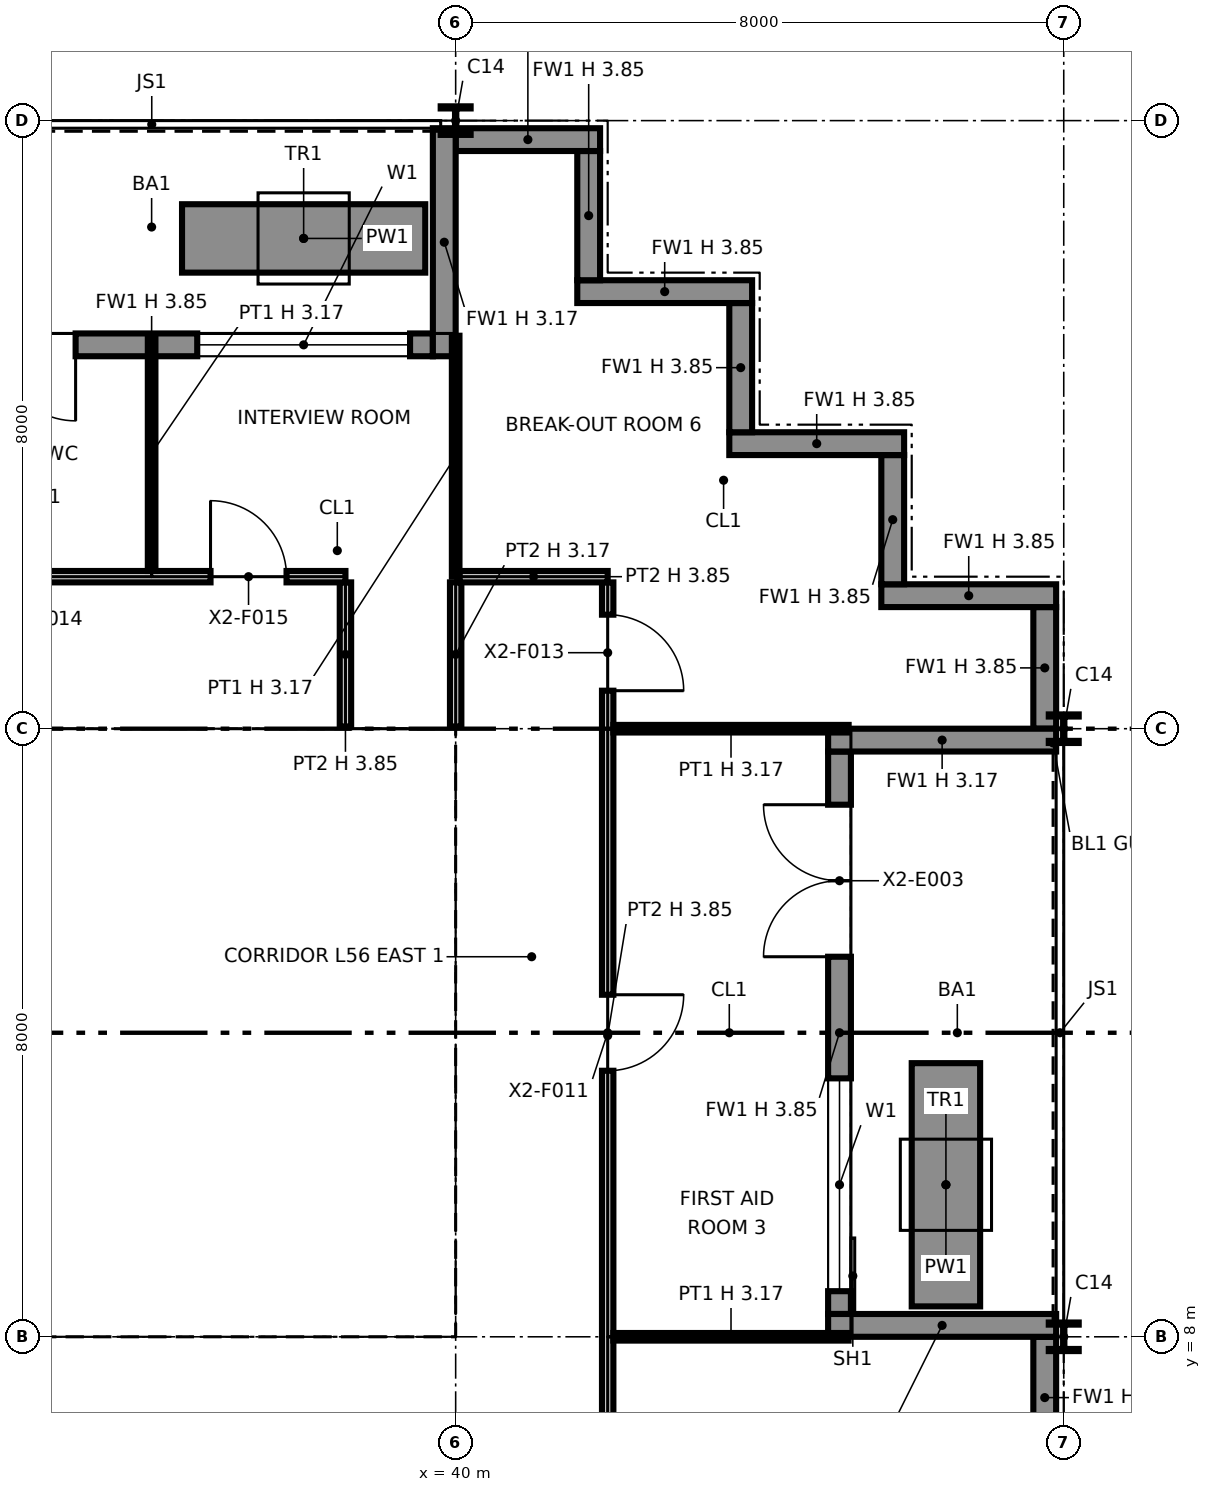
"""IFC4 building model, lengths in metres.
Left out: names, types, materials, properties, quantities, classifications, styles, units other than length and angle.
Written with IfcOpenShell. Run it as: python <this file> out.ifc"""

import sys

from ifc_helpers import new_model, si_unit, direction, frame, frame_2d, origin, origin_2d, place, context, subcontext, project, spatial, polyline, rectangle, i_section, outline, extrude, element, fill, save


model = new_model("IFC4")
c1 = context("Model", 3, precision=1e-05, world=origin(), true_north=direction((0.0, 1.0)))
c2 = subcontext(c1, "Body", "Model", "MODEL_VIEW")
j1 = project(units=[si_unit("LENGTHUNIT", "METRE"), si_unit("PLANEANGLEUNIT", "RADIAN")], contexts=[c1])
p1 = place(None, origin())
s1 = spatial("IfcSite", under=j1, at=p1, CompositionType="ELEMENT")
p2 = place(p1, origin())
s2 = spatial("IfcBuilding", under=s1, at=p2, CompositionType="ELEMENT")
p3 = place(p2, frame((0.0, 0.0, 259.0)))
s3 = spatial("IfcBuildingStorey", under=s2, at=p3, CompositionType="ELEMENT", Elevation=259.0)
for number, where, z_axis, x_axis in (
    (1, (40.0, 8.0, 0.0), (0.0, 0.0, 1.0), (1.0, 0.0, 0.0)),
    (2, (40.0, 16.0, 0.0), (0.0, 0.0, 1.0), (1.0, 0.0, 0.0)),
):
    element("IfcColumn", number, at=place(p3, frame(where, z_axis=z_axis, x_axis=x_axis)), inside=s3, PredefinedType="COLUMN", context=c2, shape_type="SweptSolid", body=[
        extrude(i_section(OverallWidth=0.371, OverallDepth=0.361, WebThickness=0.012, FlangeThickness=0.02, at=origin_2d()), origin(), (0.0, 0.0, 1.0), 3.85),
    ])
for number, where, z_axis, x_axis in (
    (3, (40.0, 24.0, 0.0), (0.0, 0.0, 1.0), (1.0, 0.0, 0.0)),
    (4, (48.0, 8.0, 0.0), (0.0, 0.0, 1.0), (1.0, 0.0, 0.0)),
    (5, (48.0, 16.0, 0.0), (0.0, 0.0, 1.0), (1.0, 0.0, 0.0)),
):
    element("IfcColumn", number, at=place(p3, frame(where, z_axis=z_axis, x_axis=x_axis)), inside=s3, PredefinedType="COLUMN", context=c2, shape_type="SweptSolid", body=[
        extrude(i_section(OverallWidth=0.394, OverallDepth=0.376, WebThickness=0.017, FlangeThickness=0.028, at=origin_2d()), origin(), (0.0, 0.0, 1.0), 3.85),
    ])
p4 = place(p3, frame((47.75, 6.4, 0.0), z_axis=(0.0, 0.0, 1.0), x_axis=(0.0, 1.0, 0.0)))
e6 = element("IfcWall", 6, at=p4, inside=s3, PredefinedType="SOLIDWALL", context=c2, shape_type="SweptSolid", body=[
    extrude(rectangle(XDim=1.6, YDim=0.3, at=frame_2d((0.8, 0.0))), origin(), (0.0, 0.0, 1.0), 3.85),
])
p5 = place(p3, frame((45.05, 8.3, 0.0), z_axis=(0.0, 0.0, 1.0), x_axis=(0.0, 1.0, 0.0)))
e7 = element("IfcWall", 7, at=p5, inside=s3, PredefinedType="SOLIDWALL", context=c2, shape_type="SweptSolid", body=[
    extrude(rectangle(XDim=7.4, YDim=0.3, at=frame_2d((3.7, 0.0))), origin(), (0.0, 0.0, 1.0), 3.85),
])
p6 = place(p5, frame((0.3, 0.0, 0.9)))
e8 = element("IfcOpeningElement", 8, at=p6, cuts=e7, PredefinedType="OPENING", context=c2, shape_type="SweptSolid", body=[
    extrude(rectangle(XDim=2.8, YDim=2.2, at=frame_2d((1.4, 1.1))), frame((0.0, 0.16, 0.0), z_axis=(0.0, -1.0, 0.0), x_axis=(1.0, 0.0, 0.0)), (0.0, 0.0, 1.0), 0.32),
])
p7 = place(p5, frame((4.7, 0.0, 0.0)))
e9 = element("IfcOpeningElement", 9, at=p7, cuts=e7, PredefinedType="OPENING", context=c2, shape_type="SweptSolid", body=[
    extrude(rectangle(XDim=2.0, YDim=2.4, at=frame_2d((1.0, 1.2))), frame((0.0, 0.16, 0.0), z_axis=(0.0, -1.0, 0.0), x_axis=(1.0, 0.0, 0.0)), (0.0, 0.0, 1.0), 0.32),
])
for number, where, z_axis, x_axis in (
    (10, (47.9, 8.15, 0.0), (0.0, 0.0, 1.0), (-1.0, 0.0, 0.0)),
    (11, (47.9, 15.85, 0.0), (0.0, 0.0, 1.0), (-1.0, 0.0, 0.0)),
):
    element("IfcWall", number, at=place(p3, frame(where, z_axis=z_axis, x_axis=x_axis)), inside=s3, PredefinedType="SOLIDWALL", context=c2, shape_type="SweptSolid", body=[
        extrude(rectangle(XDim=3.0, YDim=0.3, at=frame_2d((1.5, 0.0))), origin(), (0.0, 0.0, 1.0), 3.171),
    ])
p8 = place(p3, frame((47.75, 16.0, 0.0), z_axis=(0.0, 0.0, 1.0), x_axis=(0.0, 1.0, 0.0)))
e12 = element("IfcWall", 12, at=p8, inside=s3, PredefinedType="SOLIDWALL", context=c2, shape_type="SweptSolid", body=[
    extrude(rectangle(XDim=1.6, YDim=0.3, at=frame_2d((0.8, 0.0))), origin(), (0.0, 0.0, 1.0), 3.85),
])
p9 = place(p3, frame((46.45, 8.4, 0.0), z_axis=(0.0, 0.0, 1.0), x_axis=(0.0, 1.0, 0.0)))
e13 = element("IfcWall", 13, at=p9, inside=s3, PredefinedType="SOLIDWALL", context=c2, shape_type="SweptSolid", body=[
    extrude(rectangle(XDim=3.2, YDim=0.9, at=frame_2d((1.6, 0.0))), origin(), (0.0, 0.0, 1.0), 0.6),
])
p10 = place(p3, frame((47.9, 17.75, 0.0), z_axis=(0.0, 0.0, 1.0), x_axis=(-1.0, 0.0, 0.0)))
e14 = element("IfcWall", 14, at=p10, inside=s3, PredefinedType="SOLIDWALL", context=c2, shape_type="SweptSolid", body=[
    extrude(rectangle(XDim=2.3, YDim=0.3, at=frame_2d((1.15, 0.0))), origin(), (0.0, 0.0, 1.0), 3.85),
])
p11 = place(p3, frame((45.75, 17.9, 0.0), z_axis=(0.0, 0.0, 1.0), x_axis=(0.0, 1.0, 0.0)))
e15 = element("IfcWall", 15, at=p11, inside=s3, PredefinedType="SOLIDWALL", context=c2, shape_type="SweptSolid", body=[
    extrude(rectangle(XDim=1.7, YDim=0.3, at=frame_2d((0.85, 0.0))), origin(), (0.0, 0.0, 1.0), 3.85),
])
p12 = place(p3, frame((45.9, 19.75, 0.0), z_axis=(0.0, 0.0, 1.0), x_axis=(-1.0, 0.0, 0.0)))
e16 = element("IfcWall", 16, at=p12, inside=s3, PredefinedType="SOLIDWALL", context=c2, shape_type="SweptSolid", body=[
    extrude(rectangle(XDim=2.3, YDim=0.3, at=frame_2d((1.15, 0.0))), origin(), (0.0, 0.0, 1.0), 3.85),
])
p13 = place(p3, frame((43.75, 19.9, 0.0), z_axis=(0.0, 0.0, 1.0), x_axis=(0.0, 1.0, 0.0)))
e17 = element("IfcWall", 17, at=p13, inside=s3, PredefinedType="SOLIDWALL", context=c2, shape_type="SweptSolid", body=[
    extrude(rectangle(XDim=1.7, YDim=0.3, at=frame_2d((0.85, 0.0))), origin(), (0.0, 0.0, 1.0), 3.85),
])
p14 = place(p3, frame((43.9, 21.75, 0.0), z_axis=(0.0, 0.0, 1.0), x_axis=(-1.0, 0.0, 0.0)))
e18 = element("IfcWall", 18, at=p14, inside=s3, PredefinedType="SOLIDWALL", context=c2, shape_type="SweptSolid", body=[
    extrude(rectangle(XDim=2.3, YDim=0.3, at=frame_2d((1.15, 0.0))), origin(), (0.0, 0.0, 1.0), 3.85),
])
p15 = place(p3, frame((41.75, 21.9, 0.0), z_axis=(0.0, 0.0, 1.0), x_axis=(0.0, 1.0, 0.0)))
e19 = element("IfcWall", 19, at=p15, inside=s3, PredefinedType="SOLIDWALL", context=c2, shape_type="SweptSolid", body=[
    extrude(rectangle(XDim=1.7, YDim=0.3, at=frame_2d((0.85, 0.0))), origin(), (0.0, 0.0, 1.0), 3.85),
])
p16 = place(p3, frame((41.9, 23.75, 0.0), z_axis=(0.0, 0.0, 1.0), x_axis=(-1.0, 0.0, 0.0)))
e20 = element("IfcWall", 20, at=p16, inside=s3, PredefinedType="SOLIDWALL", context=c2, shape_type="SweptSolid", body=[
    extrude(rectangle(XDim=1.9, YDim=0.3, at=frame_2d((0.95, 0.0))), origin(), (0.0, 0.0, 1.0), 3.85),
])
p17 = place(p3, frame((39.7, 21.05, 0.0), z_axis=(0.0, 0.0, 1.0), x_axis=(-1.0, 0.0, 0.0)))
e21 = element("IfcWall", 21, at=p17, inside=s3, PredefinedType="SOLIDWALL", context=c2, shape_type="SweptSolid", body=[
    extrude(rectangle(XDim=7.4, YDim=0.3, at=frame_2d((3.7, 0.0))), origin(), (0.0, 0.0, 1.0), 3.85),
])
p18 = place(p17, frame((0.3, 0.0, 0.9)))
e22 = element("IfcOpeningElement", 22, at=p18, cuts=e21, PredefinedType="OPENING", context=c2, shape_type="SweptSolid", body=[
    extrude(rectangle(XDim=2.8, YDim=2.2, at=frame_2d((1.4, 1.1))), frame((0.0, 0.16, 0.0), z_axis=(0.0, -1.0, 0.0), x_axis=(1.0, 0.0, 0.0)), (0.0, 0.0, 1.0), 0.32),
])
p19 = place(p17, frame((4.7, 0.0, 0.0)))
e23 = element("IfcOpeningElement", 23, at=p19, cuts=e21, PredefinedType="OPENING", context=c2, shape_type="SweptSolid", body=[
    extrude(rectangle(XDim=2.0, YDim=2.4, at=frame_2d((1.0, 1.2))), frame((0.0, 0.16, 0.0), z_axis=(0.0, -1.0, 0.0), x_axis=(1.0, 0.0, 0.0)), (0.0, 0.0, 1.0), 0.32),
])
p20 = place(p3, frame((39.85, 23.9, 0.0), z_axis=(0.0, 0.0, 1.0), x_axis=(0.0, -1.0, 0.0)))
e24 = element("IfcWall", 24, at=p20, inside=s3, PredefinedType="SOLIDWALL", context=c2, shape_type="SweptSolid", body=[
    extrude(rectangle(XDim=3.0, YDim=0.3, at=frame_2d((1.5, 0.0))), origin(), (0.0, 0.0, 1.0), 3.171),
])
p21 = place(p3, frame((39.6, 22.45, 0.0), z_axis=(0.0, 0.0, 1.0), x_axis=(-1.0, 0.0, 0.0)))
e25 = element("IfcWall", 25, at=p21, inside=s3, PredefinedType="SOLIDWALL", context=c2, shape_type="SweptSolid", body=[
    extrude(rectangle(XDim=3.2, YDim=0.9, at=frame_2d((1.6, 0.0))), origin(), (0.0, 0.0, 1.0), 0.6),
])
p22 = place(p3, frame((24.65, 8.75, 0.0), z_axis=(0.0, 0.0, 1.0), x_axis=(1.0, 0.0, 0.0)))
e26 = element("IfcWall", 26, at=p22, inside=s3, PredefinedType="PARTITIONING", context=c2, shape_type="SweptSolid", body=[
    extrude(outline(polyline([(0.0, 0.0), (14.7, 0.0), (14.7, 3.85), (7.438, 3.85), (7.438, 3.308), (7.262, 3.308), (7.261, 3.85), (0.0, 3.85), (0.0, 0.0)])), frame((0.0, 0.1, 0.0), z_axis=(0.0, -1.0, 0.0), x_axis=(1.0, 0.0, 0.0)), (0.0, 0.0, 1.0), 0.2),
])
p23 = place(p3, frame((24.65, 15.25, 0.0), z_axis=(0.0, 0.0, 1.0), x_axis=(1.0, 0.0, 0.0)))
e27 = element("IfcWall", 27, at=p23, inside=s3, PredefinedType="PARTITIONING", context=c2, shape_type="SweptSolid", body=[
    extrude(outline(polyline([(0.0, 0.0), (14.7, 0.0), (14.7, 3.85), (7.438, 3.85), (7.438, 3.308), (7.262, 3.308), (7.261, 3.85), (0.0, 3.85), (0.0, 0.0)])), frame((0.0, 0.1, 0.0), z_axis=(0.0, -1.0, 0.0), x_axis=(1.0, 0.0, 0.0)), (0.0, 0.0, 1.0), 0.2),
])
p24 = place(p23, frame((2.85, 0.0, 0.0)))
e28 = element("IfcOpeningElement", 28, at=p24, cuts=e27, PredefinedType="OPENING", context=c2, shape_type="SweptSolid", body=[
    extrude(rectangle(XDim=1.8, YDim=2.1, at=frame_2d((0.9, 1.05))), frame((0.0, 0.11, 0.0), z_axis=(0.0, -1.0, 0.0), x_axis=(1.0, 0.0, 0.0)), (0.0, 0.0, 1.0), 0.22),
])
p25 = place(p23, frame((9.95, 0.0, 0.0), z_axis=(0.0, 0.0, 1.0), x_axis=(-1.0, 0.0, 0.0)))
e29 = element("IfcOpeningElement", 29, at=p25, cuts=e27, PredefinedType="OPENING", context=c2, shape_type="SweptSolid", body=[
    extrude(rectangle(XDim=1.4, YDim=2.1, at=frame_2d((0.7, 1.05))), frame((0.0, 0.11, 0.0), z_axis=(0.0, -1.0, 0.0), x_axis=(1.0, 0.0, 0.0)), (0.0, 0.0, 1.0), 0.22),
])
p26 = place(p23, frame((13.4, 0.0, 0.0), z_axis=(0.0, 0.0, 1.0), x_axis=(-1.0, 0.0, 0.0)))
e30 = element("IfcOpeningElement", 30, at=p26, cuts=e27, PredefinedType="OPENING", context=c2, shape_type="SweptSolid", body=[
    extrude(rectangle(XDim=1.4, YDim=2.1, at=frame_2d((0.7, 1.05))), frame((0.0, 0.11, 0.0), z_axis=(0.0, -1.0, 0.0), x_axis=(1.0, 0.0, 0.0)), (0.0, 0.0, 1.0), 0.22),
])
for number, where, z_axis, x_axis in (
    (31, (35.6, 8.85, 0.0), (0.0, 0.0, 1.0), (0.0, 1.0, 0.0)),
    (32, (39.25, 8.85, 0.0), (0.0, 0.0, 1.0), (0.0, 1.0, 0.0)),
):
    element("IfcWall", number, at=place(p3, frame(where, z_axis=z_axis, x_axis=x_axis)), inside=s3, PredefinedType="PARTITIONING", context=c2, shape_type="SweptSolid", body=[
        extrude(rectangle(XDim=6.3, YDim=0.2, at=frame_2d((3.15, 0.0))), origin(), (0.0, 0.0, 1.0), 3.85),
    ])
p27 = place(p3, frame((42.0, 6.0, 0.0), z_axis=(0.0, 0.0, 1.0), x_axis=(0.0, 1.0, 0.0)))
e33 = element("IfcWall", 33, at=p27, inside=s3, PredefinedType="PARTITIONING", context=c2, shape_type="SweptSolid", body=[
    extrude(outline(polyline([(0.0, 0.0), (11.925, 0.0), (11.925, 3.85), (10.3, 3.85), (10.298, 3.172), (9.702, 3.172), (9.7, 3.85), (6.3, 3.85), (6.298, 3.172), (5.702, 3.172), (5.7, 3.85), (2.3, 3.85), (2.298, 3.172), (1.702, 3.172), (1.7, 3.85), (0.0, 3.85), (0.0, 0.0)])), frame((0.0, 0.075, 0.0), z_axis=(0.0, -1.0, 0.0), x_axis=(1.0, 0.0, 0.0)), (0.0, 0.0, 1.0), 0.15),
])
p28 = place(p27, frame((6.5, 0.0, 0.0), z_axis=(0.0, 0.0, 1.0), x_axis=(-1.0, 0.0, 0.0)))
e34 = element("IfcOpeningElement", 34, at=p28, cuts=e33, PredefinedType="OPENING", context=c2, shape_type="SweptSolid", body=[
    extrude(rectangle(XDim=1.0, YDim=2.1, at=frame_2d((0.5, 1.05))), frame((0.0, 0.085, 0.0), z_axis=(0.0, -1.0, 0.0), x_axis=(1.0, 0.0, 0.0)), (0.0, 0.0, 1.0), 0.17),
])
p29 = place(p27, frame((11.5, 0.0, 0.0), z_axis=(0.0, 0.0, 1.0), x_axis=(-1.0, 0.0, 0.0)))
e35 = element("IfcOpeningElement", 35, at=p29, cuts=e33, PredefinedType="OPENING", context=c2, shape_type="SweptSolid", body=[
    extrude(rectangle(XDim=1.0, YDim=2.1, at=frame_2d((0.5, 1.05))), frame((0.0, 0.085, 0.0), z_axis=(0.0, -1.0, 0.0), x_axis=(1.0, 0.0, 0.0)), (0.0, 0.0, 1.0), 0.17),
])
for number, where, z_axis, x_axis in (
    (36, (42.075, 8.0, 0.0), (0.0, 0.0, 1.0), (1.0, 0.0, 0.0)),
    (37, (42.075, 16.0, 0.0), (0.0, 0.0, 1.0), (1.0, 0.0, 0.0)),
):
    element("IfcWall", number, at=place(p3, frame(where, z_axis=z_axis, x_axis=x_axis)), inside=s3, PredefinedType="PARTITIONING", context=c2, shape_type="SweptSolid", body=[
        extrude(rectangle(XDim=3.095, YDim=0.1, at=frame_2d((1.547, 0.0))), origin(), (0.0, 0.0, 1.0), 3.172),
    ])
p30 = place(p3, frame((38.55, 16.03, 0.0), z_axis=(0.0, 0.0, 1.0), x_axis=(0.0, 1.0, 0.0)))
e38 = element("IfcWall", 38, at=p30, inside=s3, PredefinedType="PARTITIONING", context=c2, shape_type="SweptSolid", body=[
    extrude(rectangle(XDim=1.895, YDim=0.15, at=frame_2d((0.948, 0.0))), origin(), (0.0, 0.0, 1.0), 3.85),
])
p31 = place(p3, frame((40.0, 16.03, 0.0), z_axis=(0.0, 0.0, 1.0), x_axis=(0.0, 1.0, 0.0)))
e39 = element("IfcWall", 39, at=p31, inside=s3, PredefinedType="PARTITIONING", context=c2, shape_type="SweptSolid", body=[
    extrude(rectangle(XDim=1.895, YDim=0.15, at=frame_2d((0.948, 0.0))), origin(), (0.0, 0.0, 1.0), 3.172),
])
p32 = place(p3, frame((26.075, 18.0, 0.0), z_axis=(0.0, 0.0, 1.0), x_axis=(1.0, 0.0, 0.0)))
e40 = element("IfcWall", 40, at=p32, inside=s3, PredefinedType="PARTITIONING", context=c2, shape_type="SweptSolid", body=[
    extrude(rectangle(XDim=12.475, YDim=0.15, at=frame_2d((6.238, 0.0))), origin(), (0.0, 0.0, 1.0), 3.85),
])
p33 = place(p32, frame((7.425, 0.0, 0.0)))
e41 = element("IfcOpeningElement", 41, at=p33, cuts=e40, PredefinedType="OPENING", context=c2, shape_type="SweptSolid", body=[
    extrude(rectangle(XDim=1.0, YDim=2.1, at=frame_2d((0.5, 1.05))), frame((0.0, 0.085, 0.0), z_axis=(0.0, -1.0, 0.0), x_axis=(1.0, 0.0, 0.0)), (0.0, 0.0, 1.0), 0.17),
])
p34 = place(p32, frame((10.7, 0.0, 0.0)))
e42 = element("IfcOpeningElement", 42, at=p34, cuts=e40, PredefinedType="OPENING", context=c2, shape_type="SweptSolid", body=[
    extrude(rectangle(XDim=1.0, YDim=2.1, at=frame_2d((0.5, 1.05))), frame((0.0, 0.085, 0.0), z_axis=(0.0, -1.0, 0.0), x_axis=(1.0, 0.0, 0.0)), (0.0, 0.0, 1.0), 0.17),
])
p35 = place(p32, frame((3.925, 0.0, 0.0), z_axis=(0.0, 0.0, 1.0), x_axis=(-1.0, 0.0, 0.0)))
e43 = element("IfcOpeningElement", 43, at=p35, cuts=e40, PredefinedType="OPENING", context=c2, shape_type="SweptSolid", body=[
    extrude(rectangle(XDim=1.0, YDim=2.1, at=frame_2d((0.5, 1.05))), frame((0.0, 0.085, 0.0), z_axis=(0.0, -1.0, 0.0), x_axis=(1.0, 0.0, 0.0)), (0.0, 0.0, 1.0), 0.17),
])
p36 = place(p3, frame((36.0, 18.075, 0.0), z_axis=(0.0, 0.0, 1.0), x_axis=(0.0, 1.0, 0.0)))
e44 = element("IfcWall", 44, at=p36, inside=s3, PredefinedType="PARTITIONING", context=c2, shape_type="SweptSolid", body=[
    extrude(rectangle(XDim=3.095, YDim=0.1, at=frame_2d((1.547, 0.0))), origin(), (0.0, 0.0, 1.0), 3.172),
])
p37 = place(p3, frame((40.05, 18.0, 0.0), z_axis=(0.0, 0.0, 1.0), x_axis=(1.0, 0.0, 0.0)))
e45 = element("IfcWall", 45, at=p37, inside=s3, PredefinedType="PARTITIONING", context=c2, shape_type="SweptSolid", body=[
    extrude(rectangle(XDim=1.95, YDim=0.15, at=frame_2d((0.975, 0.0))), origin(), (0.0, 0.0, 1.0), 3.85),
])
p38 = place(p3, frame((40.0, 18.0, 0.0), z_axis=(0.0, 0.0, 1.0), x_axis=(0.0, 1.0, 0.0)))
e46 = element("IfcWall", 46, at=p38, inside=s3, PredefinedType="PARTITIONING", context=c2, shape_type="SweptSolid", body=[
    extrude(rectangle(XDim=3.17, YDim=0.1, at=frame_2d((1.585, 0.0))), origin(), (0.0, 0.0, 1.0), 3.172),
])
p39 = place(p6, origin())
e47 = element("IfcWindow", 47, at=p39, inside=s3, PartitioningType="SINGLE_PANEL", PredefinedType="WINDOW", context=c2, shape_type="SweptSolid", body=[
    extrude(rectangle(XDim=2.8, YDim=2.2, at=frame_2d((1.4, 1.1))), frame((0.0, 0.03, 0.0), z_axis=(0.0, -1.0, 0.0), x_axis=(1.0, 0.0, 0.0)), (0.0, 0.0, 1.0), 0.06),
])
fill(e8, e47)
p40 = place(p7, origin())
e48 = element("IfcDoor", 48, at=p40, inside=s3, OperationType="DOUBLE_DOOR_SINGLE_SWING", PredefinedType="DOOR", context=c2, shape_type="SweptSolid", body=[
    extrude(rectangle(XDim=2.0, YDim=2.4, at=frame_2d((1.0, 1.2))), frame((0.0, 0.025, 0.0), z_axis=(0.0, -1.0, 0.0), x_axis=(1.0, 0.0, 0.0)), (0.0, 0.0, 1.0), 0.05),
])
fill(e9, e48)
p41 = place(p18, origin())
e49 = element("IfcWindow", 49, at=p41, inside=s3, PartitioningType="SINGLE_PANEL", PredefinedType="WINDOW", context=c2, shape_type="SweptSolid", body=[
    extrude(rectangle(XDim=2.8, YDim=2.2, at=frame_2d((1.4, 1.1))), frame((0.0, 0.03, 0.0), z_axis=(0.0, -1.0, 0.0), x_axis=(1.0, 0.0, 0.0)), (0.0, 0.0, 1.0), 0.06),
])
fill(e22, e49)
p42 = place(p19, origin())
e50 = element("IfcDoor", 50, at=p42, inside=s3, OperationType="DOUBLE_DOOR_SINGLE_SWING", PredefinedType="DOOR", context=c2, shape_type="SweptSolid", body=[
    extrude(rectangle(XDim=2.0, YDim=2.4, at=frame_2d((1.0, 1.2))), frame((0.0, 0.025, 0.0), z_axis=(0.0, -1.0, 0.0), x_axis=(1.0, 0.0, 0.0)), (0.0, 0.0, 1.0), 0.05),
])
fill(e23, e50)
p43 = place(p26, origin())
e51 = element("IfcDoor", 51, at=p43, inside=s3, OperationType="DOUBLE_DOOR_SINGLE_SWING", PredefinedType="NOTDEFINED", context=c2, shape_type="SweptSolid", body=[
    extrude(rectangle(XDim=1.4, YDim=2.1, at=frame_2d((0.7, 1.05))), frame((0.0, 0.025, 0.0), z_axis=(0.0, -1.0, 0.0), x_axis=(1.0, 0.0, 0.0)), (0.0, 0.0, 1.0), 0.05),
])
fill(e30, e51)
p44 = place(p28, origin())
e52 = element("IfcDoor", 52, at=p44, inside=s3, OperationType="SINGLE_SWING_LEFT", PredefinedType="DOOR", context=c2, shape_type="SweptSolid", body=[
    extrude(rectangle(XDim=1.0, YDim=2.1, at=frame_2d((0.5, 1.05))), frame((0.0, 0.025, 0.0), z_axis=(0.0, -1.0, 0.0), x_axis=(1.0, 0.0, 0.0)), (0.0, 0.0, 1.0), 0.05),
])
fill(e34, e52)
p45 = place(p29, origin())
e53 = element("IfcDoor", 53, at=p45, inside=s3, OperationType="SINGLE_SWING_RIGHT", PredefinedType="DOOR", context=c2, shape_type="SweptSolid", body=[
    extrude(rectangle(XDim=1.0, YDim=2.1, at=frame_2d((0.5, 1.05))), frame((0.0, 0.025, 0.0), z_axis=(0.0, -1.0, 0.0), x_axis=(1.0, 0.0, 0.0)), (0.0, 0.0, 1.0), 0.05),
])
fill(e35, e53)
p46 = place(p34, origin())
e54 = element("IfcDoor", 54, at=p46, inside=s3, OperationType="SINGLE_SWING_LEFT", PredefinedType="DOOR", context=c2, shape_type="SweptSolid", body=[
    extrude(rectangle(XDim=1.0, YDim=2.1, at=frame_2d((0.5, 1.05))), frame((0.0, 0.025, 0.0), z_axis=(0.0, -1.0, 0.0), x_axis=(1.0, 0.0, 0.0)), (0.0, 0.0, 1.0), 0.05),
])
fill(e42, e54)
save(model, sys.argv[1])
